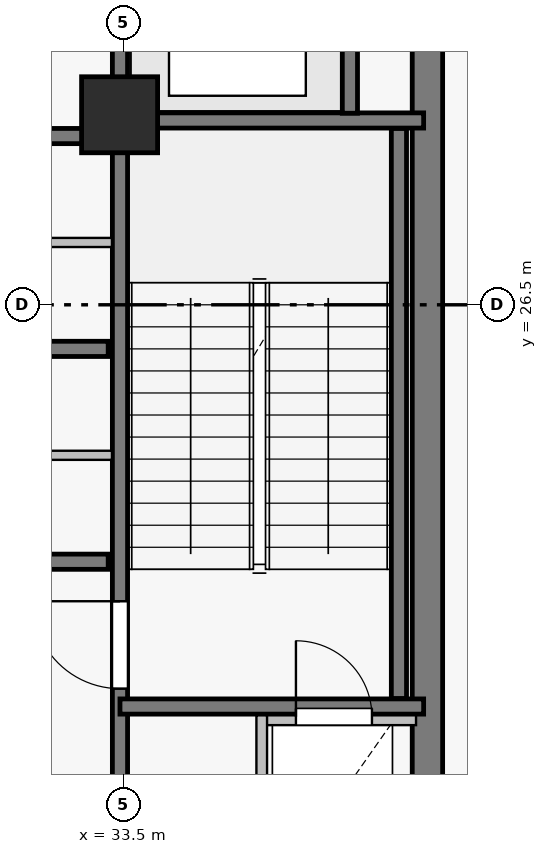
"""IFC4 building model, lengths in metres.
Left out: names, types, materials, properties, quantities, classifications, styles, units other than length and angle.
Written with IfcOpenShell. Run it as: python <this file> out.ifc"""

import sys

from ifc_helpers import new_model, si_unit, direction, frame, frame_2d, origin, origin_with_axes, origin_2d, place, context, subcontext, project, spatial, rectangle, extrude, source, transform, mapped, element, fill, save


model = new_model("IFC4")
c1 = context("Model", 3, precision=1e-05, world=origin(), true_north=direction((0.0, 1.0)))
c2 = subcontext(c1, "Body", "Model", "MODEL_VIEW")
j1 = project(units=[si_unit("LENGTHUNIT", "METRE"), si_unit("PLANEANGLEUNIT", "RADIAN")], contexts=[c1])
p1 = place(None, origin())
s1 = spatial("IfcSite", under=j1, at=p1, CompositionType="ELEMENT")
p2 = place(p1, origin())
s2 = spatial("IfcBuilding", under=s1, at=p2, CompositionType="ELEMENT")
p3 = place(p2, frame((0.0, 0.0, 208.4)))
s3 = spatial("IfcBuildingStorey", under=s2, at=p3, CompositionType="ELEMENT", Elevation=208.4)
p4 = place(p3, frame((37.5, 18.3, 0.0), z_axis=(0.0, 0.0, 1.0), x_axis=(0.0, 1.0, 0.0)))
e1 = element("IfcWall", 1, at=p4, inside=s3, PredefinedType="SHEAR", context=c2, shape_type="SweptSolid", body=[
    extrude(rectangle(XDim=16.4, YDim=0.4, at=frame_2d((8.2, 0.0))), origin(), (0.0, 0.0, 1.0), 4.3),
])
p5 = place(p4, frame((14.15, 0.0, 0.0)))
e2 = element("IfcOpeningElement", 2, at=p5, cuts=e1, PredefinedType="OPENING", context=c2, shape_type="SweptSolid", body=[
    extrude(rectangle(XDim=1.2, YDim=2.15, at=frame_2d((0.6, 1.075))), frame((0.0, 0.21, 0.0), z_axis=(0.0, -1.0, 0.0), x_axis=(1.0, 0.0, 0.0)), (0.0, 0.0, 1.0), 0.42),
])
m1 = source(origin_with_axes(), c2, "Body", "SweptSolid", [
    extrude(rectangle(XDim=1.0, YDim=1.0, at=origin_2d()), origin(), (0.0, 0.0, 1.0), 4.5),
])
p6 = place(p3, frame((33.45, 29.0, 0.0), z_axis=(0.0, 0.0, 1.0), x_axis=(1.0, 0.0, 0.0)))
e3 = element("IfcColumn", 3, at=p6, inside=s3, PredefinedType="COLUMN", context=c2, shape_type="MappedRepresentation", body=[
    mapped(m1, transform((0.0, 0.0, 0.0), scale=1.0)),
])
p7 = place(p3, frame((35.32, 21.08, 0.0), z_axis=(0.0, 0.0, 1.0), x_axis=(1.0, 0.0, 0.0)))
e4 = element("IfcWall", 4, at=p7, inside=s3, PredefinedType="SHEAR", context=c2, shape_type="SweptSolid", body=[
    extrude(rectangle(XDim=2.03, YDim=0.22, at=frame_2d((1.015, 0.0))), origin(), (0.0, 0.0, 1.0), 2.45),
])
p8 = place(p7, frame((0.45, 0.0, 0.0)))
e5 = element("IfcOpeningElement", 5, at=p8, cuts=e4, PredefinedType="OPENING", context=c2, shape_type="SweptSolid", body=[
    extrude(rectangle(XDim=1.0, YDim=2.05, at=frame_2d((0.5, 1.025))), frame((0.0, 0.12, 0.0), z_axis=(0.0, -1.0, 0.0), x_axis=(1.0, 0.0, 0.0)), (0.0, 0.0, 1.0), 0.24),
])
p9 = place(p3, frame((33.455, 18.7, 0.0), z_axis=(0.0, 0.0, 1.0), x_axis=(0.0, 1.0, 0.0)))
e6 = element("IfcWall", 6, at=p9, inside=s3, PredefinedType="SHEAR", context=c2, shape_type="SweptSolid", body=[
    extrude(rectangle(XDim=15.6, YDim=0.2, at=frame_2d((7.8, 0.0))), origin(), (0.0, 0.0, 1.0), 4.3),
])
p10 = place(p9, frame((2.75, 0.0, 0.0)))
e7 = element("IfcOpeningElement", 7, at=p10, cuts=e6, PredefinedType="OPENING", context=c2, shape_type="SweptSolid", body=[
    extrude(rectangle(XDim=1.15, YDim=2.15, at=frame_2d((0.575, 1.075))), frame((0.0, 0.11, 0.0), z_axis=(0.0, -1.0, 0.0), x_axis=(1.0, 0.0, 0.0)), (0.0, 0.0, 1.0), 0.22),
])
p11 = place(p9, frame((0.55, 0.0, 0.0)))
e8 = element("IfcOpeningElement", 8, at=p11, cuts=e6, PredefinedType="OPENING", context=c2, shape_type="SweptSolid", body=[
    extrude(rectangle(XDim=0.94, YDim=2.1, at=frame_2d((0.47, 1.05))), frame((0.0, 0.11, 0.0), z_axis=(0.0, -1.0, 0.0), x_axis=(1.0, 0.0, 0.0)), (0.0, 0.0, 1.0), 0.22),
])
p12 = place(p3, frame((23.7, 23.12, 0.0), z_axis=(0.0, 0.0, 1.0), x_axis=(1.0, 0.0, 0.0)))
e9 = element("IfcWall", 9, at=p12, inside=s3, PredefinedType="SHEAR", context=c2, shape_type="SweptSolid", body=[
    extrude(rectangle(XDim=9.6, YDim=0.2, at=frame_2d((4.8, 0.0))), origin(), (0.0, 0.0, 1.0), 4.3),
])
p13 = place(p12, frame((2.4, 0.0, 0.0)))
e10 = element("IfcOpeningElement", 10, at=p13, cuts=e9, PredefinedType="OPENING", context=c2, shape_type="SweptSolid", body=[
    extrude(rectangle(XDim=1.0, YDim=2.15, at=frame_2d((0.5, 1.075))), frame((0.0, 0.11, 0.0), z_axis=(0.0, -1.0, 0.0), x_axis=(1.0, 0.0, 0.0)), (0.0, 0.0, 1.0), 0.22),
])
p14 = place(p3, frame((23.7, 25.92, 0.0), z_axis=(0.0, 0.0, 1.0), x_axis=(1.0, 0.0, 0.0)))
e11 = element("IfcWall", 11, at=p14, inside=s3, PredefinedType="SHEAR", context=c2, shape_type="SweptSolid", body=[
    extrude(rectangle(XDim=9.6, YDim=0.2, at=frame_2d((4.8, 0.0))), origin(), (0.0, 0.0, 1.0), 4.3),
])
p15 = place(p3, frame((23.7, 28.72, 0.0), z_axis=(0.0, 0.0, 1.0), x_axis=(1.0, 0.0, 0.0)))
e12 = element("IfcWall", 12, at=p15, inside=s3, PredefinedType="SHEAR", context=c2, shape_type="SweptSolid", body=[
    extrude(rectangle(XDim=9.6, YDim=0.2, at=frame_2d((4.8, 0.0))), origin(), (0.0, 0.0, 1.0), 4.3),
])
p16 = place(p15, frame((2.4, 0.0, 0.0)))
e13 = element("IfcOpeningElement", 13, at=p16, cuts=e12, PredefinedType="OPENING", context=c2, shape_type="SweptSolid", body=[
    extrude(rectangle(XDim=1.0, YDim=2.15, at=frame_2d((0.5, 1.075))), frame((0.0, 0.11, 0.0), z_axis=(0.0, -1.0, 0.0), x_axis=(1.0, 0.0, 0.0)), (0.0, 0.0, 1.0), 0.22),
])
p17 = place(p3, frame((37.125, 21.32, 0.0), z_axis=(0.0, 0.0, 1.0), x_axis=(0.0, 1.0, 0.0)))
e14 = element("IfcWall", 14, at=p17, inside=s3, PredefinedType="SHEAR", context=c2, shape_type="SweptSolid", body=[
    extrude(rectangle(XDim=7.5, YDim=0.2, at=frame_2d((3.75, 0.0))), origin(), (0.0, 0.0, 1.0), 4.3),
])
for number, where, z_axis, x_axis in (
    (15, (33.455, 21.215, 0.0), (0.0, 0.0, 1.0), (1.0, 0.0, 0.0)),
    (16, (33.455, 28.925, 0.0), (0.0, 0.0, 1.0), (1.0, 0.0, 0.0)),
):
    element("IfcWall", number, at=place(p3, frame(where, z_axis=z_axis, x_axis=x_axis)), inside=s3, PredefinedType="SHEAR", context=c2, shape_type="SweptSolid", body=[
        extrude(rectangle(XDim=3.995, YDim=0.2, at=frame_2d((1.998, 0.0))), origin(), (0.0, 0.0, 1.0), 4.3),
    ])
p18 = place(p3, frame((36.48, 29.02, 0.0), z_axis=(0.0, 0.0, 1.0), x_axis=(0.0, 1.0, 0.0)))
e17 = element("IfcWall", 17, at=p18, inside=s3, PredefinedType="SHEAR", context=c2, shape_type="SweptSolid", body=[
    extrude(rectangle(XDim=2.86, YDim=0.2, at=frame_2d((1.43, 0.0))), origin(), (0.0, 0.0, 1.0), 4.3),
])
p19 = place(p3, frame((23.652, 24.52, 0.0), z_axis=(0.0, 0.0, 1.0), x_axis=(1.0, 0.0, 0.0)))
e18 = element("IfcWall", 18, at=p19, inside=s3, PredefinedType="PARTITIONING", context=c2, shape_type="SweptSolid", body=[
    extrude(rectangle(XDim=9.698, YDim=0.12, at=frame_2d((4.849, 0.0))), origin(), (0.0, 0.0, 1.0), 4.3),
])
p20 = place(p19, frame((4.2, 0.0, 0.0)))
e19 = element("IfcOpeningElement", 19, at=p20, cuts=e18, PredefinedType="OPENING", context=c2, shape_type="SweptSolid", body=[
    extrude(rectangle(XDim=0.94, YDim=2.1, at=frame_2d((0.47, 1.05))), frame((0.0, 0.07, 0.0), z_axis=(0.0, -1.0, 0.0), x_axis=(1.0, 0.0, 0.0)), (0.0, 0.0, 1.0), 0.14),
])
p21 = place(p3, frame((23.652, 27.32, 0.0), z_axis=(0.0, 0.0, 1.0), x_axis=(1.0, 0.0, 0.0)))
e20 = element("IfcWall", 20, at=p21, inside=s3, PredefinedType="PARTITIONING", context=c2, shape_type="SweptSolid", body=[
    extrude(rectangle(XDim=9.698, YDim=0.12, at=frame_2d((4.849, 0.0))), origin(), (0.0, 0.0, 1.0), 4.3),
])
p22 = place(p21, frame((4.2, 0.0, 0.0)))
e21 = element("IfcOpeningElement", 21, at=p22, cuts=e20, PredefinedType="OPENING", context=c2, shape_type="SweptSolid", body=[
    extrude(rectangle(XDim=0.94, YDim=2.1, at=frame_2d((0.47, 1.05))), frame((0.0, 0.07, 0.0), z_axis=(0.0, -1.0, 0.0), x_axis=(1.0, 0.0, 0.0)), (0.0, 0.0, 1.0), 0.14),
])
p23 = place(p3, frame((35.32, 18.507, 0.0), z_axis=(0.0, 0.0, 1.0), x_axis=(0.0, 1.0, 0.0)))
e22 = element("IfcWall", 22, at=p23, inside=s3, PredefinedType="PARTITIONING", context=c2, shape_type="SweptSolid", body=[
    extrude(rectangle(XDim=2.592, YDim=0.14, at=frame_2d((1.296, 0.0))), origin(), (0.0, 0.0, 1.0), 4.3),
])
m2 = source(origin_with_axes(), c2, "Body", "SweptSolid", [
    extrude(rectangle(XDim=1.0, YDim=2.05, at=frame_2d((0.5, 1.025))), frame((0.0, 0.025, 0.0), z_axis=(0.0, -1.0, 0.0), x_axis=(1.0, 0.0, 0.0)), (0.0, 0.0, 1.0), 0.05),
])
p24 = place(p8, origin())
e23 = element("IfcDoor", 23, at=p24, inside=s3, OperationType="SINGLE_SWING_LEFT", PredefinedType="TRAPDOOR", context=c2, shape_type="MappedRepresentation", body=[
    mapped(m2, transform((0.0, 0.0, 0.0), scale=1.0)),
])
fill(e5, e23)
m3 = source(origin_with_axes(), c2, "Body", "SweptSolid", [
    extrude(rectangle(XDim=1.15, YDim=2.15, at=frame_2d((0.575, 1.075))), frame((0.0, 0.025, 0.0), z_axis=(0.0, -1.0, 0.0), x_axis=(1.0, 0.0, 0.0)), (0.0, 0.0, 1.0), 0.05),
])
p25 = place(p10, origin())
e24 = element("IfcDoor", 24, at=p25, inside=s3, OperationType="SINGLE_SWING_RIGHT", PredefinedType="DOOR", context=c2, shape_type="MappedRepresentation", body=[
    mapped(m3, transform((0.0, 0.0, 0.0), scale=1.0)),
])
fill(e7, e24)
save(model, sys.argv[1])
